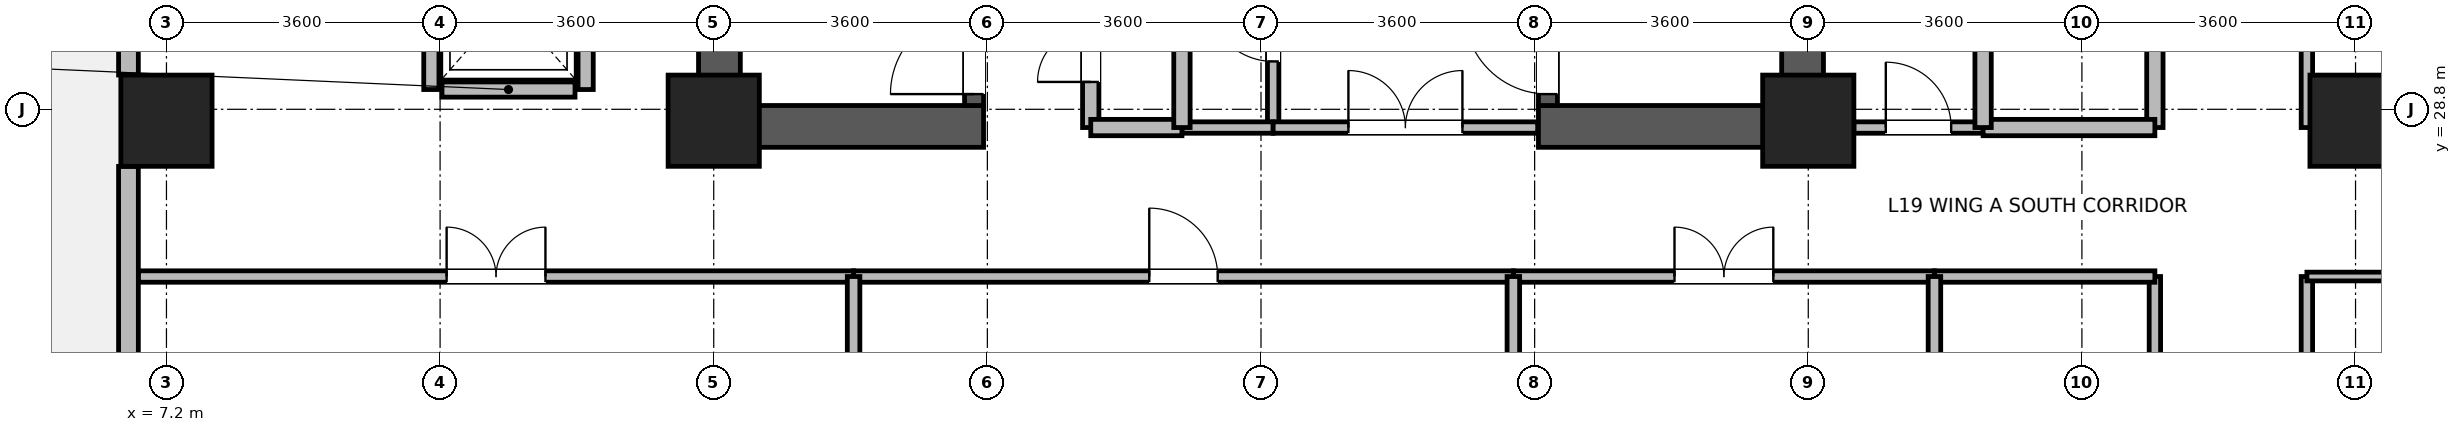
"""IFC4 building model, lengths in metres.
Left out: names, types, materials, properties, quantities, classifications, styles, units other than length and angle.
Written with IfcOpenShell. Run it as: python <this file> out.ifc"""

import sys

from ifc_helpers import new_model, si_unit, direction, frame, frame_2d, origin, origin_2d, place, context, subcontext, project, spatial, rectangle, extrude, source, transform, mapped, element, fill, save


model = new_model("IFC4")
c1 = context("Model", 3, precision=1e-05, world=origin(), true_north=direction((0.0, 1.0)))
c2 = subcontext(c1, "Body", "Model", "MODEL_VIEW")
j1 = project(units=[si_unit("LENGTHUNIT", "METRE"), si_unit("PLANEANGLEUNIT", "RADIAN")], contexts=[c1])
p1 = place(None, origin())
s1 = spatial("IfcSite", under=j1, at=p1, CompositionType="ELEMENT")
p2 = place(p1, origin())
s2 = spatial("IfcBuilding", under=s1, at=p2, CompositionType="ELEMENT")
p3 = place(p2, frame((0.0, 0.0, 78.6)))
s3 = spatial("IfcBuildingStorey", under=s2, at=p3, CompositionType="ELEMENT", Elevation=78.6)
for number, where, z_axis, x_axis in (
    (1, (14.475, 28.3, 0.0), (0.0, 0.0, 1.0), (0.0, 1.0, 0.0)),
    (2, (28.725, 28.3, 0.0), (0.0, 0.0, 1.0), (0.0, 1.0, 0.0)),
):
    element("IfcWall", number, at=place(p3, frame(where, z_axis=z_axis, x_axis=x_axis)), inside=s3, PredefinedType="SHEAR", context=c2, shape_type="SweptSolid", body=[
        extrude(rectangle(XDim=8.1, YDim=0.55, at=frame_2d((4.05, 0.0))), origin(), (0.0, 0.0, 1.0), 3.45),
    ])
for number, where, z_axis, x_axis in (
    (3, (14.75, 28.575, 0.0), (0.0, 0.0, 1.0), (1.0, 0.0, 0.0)),
    (4, (25.25, 28.575, 0.0), (0.0, 0.0, 1.0), (1.0, 0.0, 0.0)),
):
    element("IfcWall", number, at=place(p3, frame(where, z_axis=z_axis, x_axis=x_axis)), inside=s3, PredefinedType="SHEAR", context=c2, shape_type="SweptSolid", body=[
        extrude(rectangle(XDim=3.2, YDim=0.55, at=frame_2d((1.6, 0.0))), origin(), (0.0, 0.0, 1.0), 3.45),
    ])
p4 = place(p3, frame((17.825, 28.85, 0.0), z_axis=(0.0, 0.0, 1.0), x_axis=(0.0, 1.0, 0.0)))
e5 = element("IfcWall", 5, at=p4, inside=s3, PredefinedType="SHEAR", context=c2, shape_type="SweptSolid", body=[
    extrude(rectangle(XDim=7.0, YDim=0.25, at=frame_2d((3.5, 0.0))), origin(), (0.0, 0.0, 1.0), 3.45),
])
p5 = place(p4, frame((0.15, 0.0, 0.0)))
e6 = element("IfcOpeningElement", 6, at=p5, cuts=e5, PredefinedType="OPENING", context=c2, shape_type="SweptSolid", body=[
    extrude(rectangle(XDim=1.1, YDim=2.08, at=frame_2d((0.55, 1.04))), frame((0.0, 0.135, 0.0), z_axis=(0.0, -1.0, 0.0), x_axis=(1.0, 0.0, 0.0)), (0.0, 0.0, 1.0), 0.27),
])
p6 = place(p3, frame((25.375, 28.85, 0.0), z_axis=(0.0, 0.0, 1.0), x_axis=(0.0, 1.0, 0.0)))
e7 = element("IfcWall", 7, at=p6, inside=s3, PredefinedType="SHEAR", context=c2, shape_type="SweptSolid", body=[
    extrude(rectangle(XDim=7.0, YDim=0.25, at=frame_2d((3.5, 0.0))), origin(), (0.0, 0.0, 1.0), 3.45),
])
p7 = place(p6, frame((0.15, 0.0, 0.0)))
e8 = element("IfcOpeningElement", 8, at=p7, cuts=e7, PredefinedType="OPENING", context=c2, shape_type="SweptSolid", body=[
    extrude(rectangle(XDim=1.1, YDim=2.08, at=frame_2d((0.55, 1.04))), frame((0.0, 0.135, 0.0), z_axis=(0.0, -1.0, 0.0), x_axis=(1.0, 0.0, 0.0)), (0.0, 0.0, 1.0), 0.27),
])
m1 = source(origin(), c2, "Body", "SweptSolid", [
    extrude(rectangle(XDim=1.2, YDim=1.2, at=origin_2d()), origin(), (0.0, 0.0, 1.0), 3.7),
])
for number, where, z_axis, x_axis in (
    (9, (7.2, 28.65, 0.0), (0.0, 0.0, 1.0), (1.0, 0.0, 0.0)),
    (10, (14.4, 28.65, 0.0), (0.0, 0.0, 1.0), (1.0, 0.0, 0.0)),
    (11, (28.8, 28.65, 0.0), (0.0, 0.0, 1.0), (1.0, 0.0, 0.0)),
    (12, (36.0, 28.65, 0.0), (0.0, 0.0, 1.0), (1.0, 0.0, 0.0)),
):
    element("IfcColumn", number, at=place(p3, frame(where, z_axis=z_axis, x_axis=x_axis)), inside=s3, PredefinedType="COLUMN", context=c2, shape_type="MappedRepresentation", body=[
        mapped(m1, transform((0.0, 0.0, 0.0), x_axis=(1.0, 0.0, 0.0), y_axis=(0.0, 1.0, 0.0), z_axis=(0.0, 0.0, 1.0), scale=1.0)),
    ])
p8 = place(p3, frame((6.7, 29.251, 0.0), z_axis=(0.0, 0.0, 1.0), x_axis=(0.0, 1.0, 0.0)))
e13 = element("IfcWall", 13, at=p8, inside=s3, PredefinedType="STANDARD", context=c2, shape_type="SweptSolid", body=[
    extrude(rectangle(XDim=6.298, YDim=0.26, at=frame_2d((3.149, 0.0))), origin(), (0.0, 0.0, 1.0), 3.43),
])
p9 = place(p8, frame((2.674, 0.0, 0.85)))
e14 = element("IfcOpeningElement", 14, at=p9, cuts=e13, PredefinedType="OPENING", context=c2, shape_type="SweptSolid", body=[
    extrude(rectangle(XDim=0.95, YDim=1.75, at=frame_2d((0.475, 0.875))), frame((0.0, 0.14, 0.0), z_axis=(0.0, -1.0, 0.0), x_axis=(1.0, 0.0, 0.0)), (0.0, 0.0, 1.0), 0.28),
])
p10 = place(p8, frame((1.112, 0.0, 0.85)))
e15 = element("IfcOpeningElement", 15, at=p10, cuts=e13, PredefinedType="OPENING", context=c2, shape_type="SweptSolid", body=[
    extrude(rectangle(XDim=0.95, YDim=1.75, at=frame_2d((0.475, 0.875))), frame((0.0, 0.14, 0.0), z_axis=(0.0, -1.0, 0.0), x_axis=(1.0, 0.0, 0.0)), (0.0, 0.0, 1.0), 0.28),
])
p11 = place(p3, frame((6.7, 21.47, 0.0), z_axis=(0.0, 0.0, 1.0), x_axis=(0.0, 1.0, 0.0)))
e16 = element("IfcWall", 16, at=p11, inside=s3, PredefinedType="STANDARD", context=c2, shape_type="SweptSolid", body=[
    extrude(rectangle(XDim=6.579, YDim=0.26, at=frame_2d((3.29, 0.0))), origin(), (0.0, 0.0, 1.0), 3.43),
])
p12 = place(p11, frame((2.814, 0.0, 0.85)))
e17 = element("IfcOpeningElement", 17, at=p12, cuts=e16, PredefinedType="OPENING", context=c2, shape_type="SweptSolid", body=[
    extrude(rectangle(XDim=0.95, YDim=1.75, at=frame_2d((0.475, 0.875))), frame((0.0, 0.14, 0.0), z_axis=(0.0, -1.0, 0.0), x_axis=(1.0, 0.0, 0.0)), (0.0, 0.0, 1.0), 0.28),
])
p13 = place(p11, frame((1.183, 0.0, 0.85)))
e18 = element("IfcOpeningElement", 18, at=p13, cuts=e16, PredefinedType="OPENING", context=c2, shape_type="SweptSolid", body=[
    extrude(rectangle(XDim=0.95, YDim=1.75, at=frame_2d((0.475, 0.875))), frame((0.0, 0.14, 0.0), z_axis=(0.0, -1.0, 0.0), x_axis=(1.0, 0.0, 0.0)), (0.0, 0.0, 1.0), 0.28),
])
p14 = place(p3, frame((10.825, 29.06, 0.0), z_axis=(0.0, 0.0, 1.0), x_axis=(1.0, 0.0, 0.0)))
e19 = element("IfcWall", 19, at=p14, inside=s3, PredefinedType="PARTITIONING", context=c2, shape_type="SweptSolid", body=[
    extrude(rectangle(XDim=1.75, YDim=0.2, at=frame_2d((0.875, 0.0))), origin(), (0.0, 0.0, 1.0), 3.43),
])
for number, where, z_axis, x_axis in (
    (20, (10.685, 29.06, 0.0), (0.0, 0.0, 1.0), (0.0, 1.0, 0.0)),
    (21, (12.715, 29.06, 0.0), (0.0, 0.0, 1.0), (0.0, 1.0, 0.0)),
):
    element("IfcWall", number, at=place(p3, frame(where, z_axis=z_axis, x_axis=x_axis)), inside=s3, PredefinedType="PARTITIONING", context=c2, shape_type="SweptSolid", body=[
        extrude(rectangle(XDim=2.28, YDim=0.2, at=frame_2d((1.14, 0.0))), origin(), (0.0, 0.0, 1.0), 3.43),
    ])
p15 = place(p3, frame((35.36, 16.96, 0.0), z_axis=(0.0, 0.0, 1.0), x_axis=(0.0, 1.0, 0.0)))
e22 = element("IfcWall", 22, at=p15, inside=s3, PredefinedType="PARTITIONING", context=c2, shape_type="SweptSolid", body=[
    extrude(rectangle(XDim=9.64, YDim=0.15, at=frame_2d((4.82, 0.0))), origin(), (0.0, 0.0, 1.0), 3.43),
])
p16 = place(p15, frame((2.435, 0.0, 0.0)))
e23 = element("IfcOpeningElement", 23, at=p16, cuts=e22, PredefinedType="OPENING", context=c2, shape_type="SweptSolid", body=[
    extrude(rectangle(XDim=1.3, YDim=2.12, at=frame_2d((0.65, 1.06))), frame((0.0, 0.085, 0.0), z_axis=(0.0, -1.0, 0.0), x_axis=(1.0, 0.0, 0.0)), (0.0, 0.0, 1.0), 0.17),
])
p17 = place(p3, frame((6.832, 26.6, 0.0), z_axis=(0.0, 0.0, 1.0), x_axis=(1.0, 0.0, 0.0)))
e24 = element("IfcWall", 24, at=p17, inside=s3, PredefinedType="PARTITIONING", context=c2, shape_type="SweptSolid", body=[
    extrude(rectangle(XDim=9.408, YDim=0.15, at=frame_2d((4.704, 0.0))), origin(), (0.0, 0.0, 1.0), 3.43),
])
p18 = place(p17, frame((4.054, 0.0, 0.0)))
e25 = element("IfcOpeningElement", 25, at=p18, cuts=e24, PredefinedType="OPENING", context=c2, shape_type="SweptSolid", body=[
    extrude(rectangle(XDim=1.3, YDim=2.12, at=frame_2d((0.65, 1.06))), frame((0.0, 0.085, 0.0), z_axis=(0.0, -1.0, 0.0), x_axis=(1.0, 0.0, 0.0)), (0.0, 0.0, 1.0), 0.17),
])
p19 = place(p3, frame((16.24, 26.6, 0.0), z_axis=(0.0, 0.0, 1.0), x_axis=(1.0, 0.0, 0.0)))
e26 = element("IfcWall", 26, at=p19, inside=s3, PredefinedType="PARTITIONING", context=c2, shape_type="SweptSolid", body=[
    extrude(rectangle(XDim=8.68, YDim=0.15, at=frame_2d((4.34, 0.0))), origin(), (0.0, 0.0, 1.0), 3.43),
])
p20 = place(p19, frame((3.89, 0.0, 0.0)))
e27 = element("IfcOpeningElement", 27, at=p20, cuts=e26, PredefinedType="OPENING", context=c2, shape_type="SweptSolid", body=[
    extrude(rectangle(XDim=0.9, YDim=2.08, at=frame_2d((0.45, 1.04))), frame((0.0, 0.085, 0.0), z_axis=(0.0, -1.0, 0.0), x_axis=(1.0, 0.0, 0.0)), (0.0, 0.0, 1.0), 0.17),
])
p21 = place(p3, frame((35.36, 28.56, 0.0), z_axis=(0.0, 0.0, 1.0), x_axis=(0.0, 1.0, 0.0)))
e28 = element("IfcWall", 28, at=p21, inside=s3, PredefinedType="PARTITIONING", context=c2, shape_type="SweptSolid", body=[
    extrude(rectangle(XDim=7.68, YDim=0.15, at=frame_2d((3.84, 0.0))), origin(), (0.0, 0.0, 1.0), 3.43),
])
p22 = place(p21, frame((3.19, 0.0, 0.0)))
e29 = element("IfcOpeningElement", 29, at=p22, cuts=e28, PredefinedType="OPENING", context=c2, shape_type="SweptSolid", body=[
    extrude(rectangle(XDim=1.3, YDim=2.12, at=frame_2d((0.65, 1.06))), frame((0.0, 0.085, 0.0), z_axis=(0.0, -1.0, 0.0), x_axis=(1.0, 0.0, 0.0)), (0.0, 0.0, 1.0), 0.17),
])
p23 = place(p3, frame((24.92, 26.6, 0.0), z_axis=(0.0, 0.0, 1.0), x_axis=(1.0, 0.0, 0.0)))
e30 = element("IfcWall", 30, at=p23, inside=s3, PredefinedType="PARTITIONING", context=c2, shape_type="SweptSolid", body=[
    extrude(rectangle(XDim=5.54, YDim=0.15, at=frame_2d((2.77, 0.0))), origin(), (0.0, 0.0, 1.0), 3.43),
])
p24 = place(p23, frame((2.12, 0.0, 0.0)))
e31 = element("IfcOpeningElement", 31, at=p24, cuts=e30, PredefinedType="OPENING", context=c2, shape_type="SweptSolid", body=[
    extrude(rectangle(XDim=1.3, YDim=2.12, at=frame_2d((0.65, 1.06))), frame((0.0, 0.085, 0.0), z_axis=(0.0, -1.0, 0.0), x_axis=(1.0, 0.0, 0.0)), (0.0, 0.0, 1.0), 0.17),
])
p25 = place(p3, frame((33.36, 21.6, 0.0), z_axis=(0.0, 0.0, 1.0), x_axis=(0.0, 1.0, 0.0)))
e32 = element("IfcWall", 32, at=p25, inside=s3, PredefinedType="PARTITIONING", context=c2, shape_type="SweptSolid", body=[
    extrude(rectangle(XDim=5.0, YDim=0.15, at=frame_2d((2.5, 0.0))), origin(), (0.0, 0.0, 1.0), 3.43),
])
p26 = place(p25, frame((2.07, 0.0, 0.0)))
e33 = element("IfcOpeningElement", 33, at=p26, cuts=e32, PredefinedType="OPENING", context=c2, shape_type="SweptSolid", body=[
    extrude(rectangle(XDim=0.86, YDim=2.02, at=frame_2d((0.43, 1.01))), frame((0.0, 0.085, 0.0), z_axis=(0.0, -1.0, 0.0), x_axis=(1.0, 0.0, 0.0)), (0.0, 0.0, 1.0), 0.17),
])
p27 = place(p3, frame((33.36, 28.56, 0.0), z_axis=(0.0, 0.0, 1.0), x_axis=(0.0, 1.0, 0.0)))
e34 = element("IfcWall", 34, at=p27, inside=s3, PredefinedType="PARTITIONING", context=c2, shape_type="SweptSolid", body=[
    extrude(rectangle(XDim=3.84, YDim=0.215, at=frame_2d((1.92, 0.0))), origin(), (0.0, 0.0, 1.0), 3.43),
])
p28 = place(p27, frame((1.22, 0.0, 0.0)))
e35 = element("IfcOpeningElement", 35, at=p28, cuts=e34, PredefinedType="OPENING", context=c2, shape_type="SweptSolid", body=[
    extrude(rectangle(XDim=1.4, YDim=2.15, at=frame_2d((0.7, 1.075))), frame((0.0, 0.118, 0.0), z_axis=(0.0, -1.0, 0.0), x_axis=(1.0, 0.0, 0.0)), (0.0, 0.0, 1.0), 0.235),
])
p29 = place(p3, frame((30.46, 26.6, 0.0), z_axis=(0.0, 0.0, 1.0), x_axis=(1.0, 0.0, 0.0)))
e36 = element("IfcWall", 36, at=p29, inside=s3, PredefinedType="PARTITIONING", context=c2, shape_type="SweptSolid", body=[
    extrude(rectangle(XDim=2.9, YDim=0.15, at=frame_2d((1.45, 0.0))), origin(), (0.0, 0.0, 1.0), 3.43),
])
p30 = place(p3, frame((19.36, 28.56, 0.0), z_axis=(0.0, 0.0, 1.0), x_axis=(0.0, 1.0, 0.0)))
e37 = element("IfcWall", 37, at=p30, inside=s3, PredefinedType="PARTITIONING", context=c2, shape_type="SweptSolid", body=[
    extrude(rectangle(XDim=2.6, YDim=0.215, at=frame_2d((1.3, 0.0))), origin(), (0.0, 0.0, 1.0), 3.43),
])
p31 = place(p30, frame((0.6, 0.0, 0.0)))
e38 = element("IfcOpeningElement", 38, at=p31, cuts=e37, PredefinedType="OPENING", context=c2, shape_type="SweptSolid", body=[
    extrude(rectangle(XDim=1.4, YDim=2.15, at=frame_2d((0.7, 1.075))), frame((0.0, 0.118, 0.0), z_axis=(0.0, -1.0, 0.0), x_axis=(1.0, 0.0, 0.0)), (0.0, 0.0, 1.0), 0.235),
])
p32 = place(p3, frame((21.76, 28.56, 0.0), z_axis=(0.0, 0.0, 1.0), x_axis=(0.0, 1.0, 0.0)))
e39 = element("IfcWall", 39, at=p32, inside=s3, PredefinedType="PARTITIONING", context=c2, shape_type="SweptSolid", body=[
    extrude(rectangle(XDim=2.6, YDim=0.15, at=frame_2d((1.3, 0.0))), origin(), (0.0, 0.0, 1.0), 3.43),
])
p33 = place(p32, frame((0.87, 0.0, 0.0)))
e40 = element("IfcOpeningElement", 40, at=p33, cuts=e39, PredefinedType="OPENING", context=c2, shape_type="SweptSolid", body=[
    extrude(rectangle(XDim=0.86, YDim=2.02, at=frame_2d((0.43, 1.01))), frame((0.0, 0.085, 0.0), z_axis=(0.0, -1.0, 0.0), x_axis=(1.0, 0.0, 0.0)), (0.0, 0.0, 1.0), 0.17),
])
p34 = place(p3, frame((29.4, 28.56, 0.0), z_axis=(0.0, 0.0, 1.0), x_axis=(1.0, 0.0, 0.0)))
e41 = element("IfcWall", 41, at=p34, inside=s3, PredefinedType="PARTITIONING", context=c2, shape_type="SweptSolid", body=[
    extrude(rectangle(XDim=1.7, YDim=0.15, at=frame_2d((0.85, 0.0))), origin(), (0.0, 0.0, 1.0), 2.78),
])
p35 = place(p34, frame((0.42, 0.0, 0.0)))
e42 = element("IfcOpeningElement", 42, at=p35, cuts=e41, PredefinedType="OPENING", context=c2, shape_type="SweptSolid", body=[
    extrude(rectangle(XDim=0.86, YDim=2.02, at=frame_2d((0.43, 1.01))), frame((0.0, 0.085, 0.0), z_axis=(0.0, -1.0, 0.0), x_axis=(1.0, 0.0, 0.0)), (0.0, 0.0, 1.0), 0.17),
])
p36 = place(p3, frame((31.1, 28.56, 0.0), z_axis=(0.0, 0.0, 1.0), x_axis=(1.0, 0.0, 0.0)))
e43 = element("IfcWall", 43, at=p36, inside=s3, PredefinedType="PARTITIONING", context=c2, shape_type="SweptSolid", body=[
    extrude(rectangle(XDim=2.26, YDim=0.215, at=frame_2d((1.13, 0.0))), origin(), (0.0, 0.0, 1.0), 2.78),
])
p37 = place(p3, frame((20.56, 28.56, 0.0), z_axis=(0.0, 0.0, 1.0), x_axis=(1.0, 0.0, 0.0)))
e44 = element("IfcWall", 44, at=p37, inside=s3, PredefinedType="PARTITIONING", context=c2, shape_type="SweptSolid", body=[
    extrude(rectangle(XDim=1.2, YDim=0.15, at=frame_2d((0.6, 0.0))), origin(), (0.0, 0.0, 1.0), 2.23),
])
p38 = place(p3, frame((19.36, 28.56, 0.0), z_axis=(0.0, 0.0, 1.0), x_axis=(1.0, 0.0, 0.0)))
e45 = element("IfcWall", 45, at=p38, inside=s3, PredefinedType="PARTITIONING", context=c2, shape_type="SweptSolid", body=[
    extrude(rectangle(XDim=1.2, YDim=0.215, at=frame_2d((0.6, 0.0))), origin(), (0.0, 0.0, 1.0), 2.23),
])
p39 = place(p3, frame((35.36, 26.6, 0.0), z_axis=(0.0, 0.0, 1.0), x_axis=(1.0, 0.0, 0.0)))
e46 = element("IfcWall", 46, at=p39, inside=s3, PredefinedType="PARTITIONING", context=c2, shape_type="SweptSolid", body=[
    extrude(rectangle(XDim=7.24, YDim=0.115, at=frame_2d((3.62, 0.0))), origin(), (0.0, 0.0, 1.0), 3.43),
])
for number, where, z_axis, x_axis in (
    (47, (16.24, 21.732, 0.0), (0.0, 0.0, 1.0), (0.0, 1.0, 0.0)),
    (48, (24.92, 21.732, 0.0), (0.0, 0.0, 1.0), (0.0, 1.0, 0.0)),
    (49, (30.46, 21.732, 0.0), (0.0, 0.0, 1.0), (0.0, 1.0, 0.0)),
):
    element("IfcWall", number, at=place(p3, frame(where, z_axis=z_axis, x_axis=x_axis)), inside=s3, PredefinedType="PARTITIONING", context=c2, shape_type="SweptSolid", body=[
        extrude(rectangle(XDim=4.868, YDim=0.165, at=frame_2d((2.434, 0.0))), origin(), (0.0, 0.0, 1.0), 3.43),
    ])
p40 = place(p3, frame((31.1, 28.56, 0.0), z_axis=(0.0, 0.0, 1.0), x_axis=(0.0, 1.0, 0.0)))
e50 = element("IfcWall", 50, at=p40, inside=s3, PredefinedType="PARTITIONING", context=c2, shape_type="SweptSolid", body=[
    extrude(rectangle(XDim=3.84, YDim=0.215, at=frame_2d((1.92, 0.0))), origin(), (0.0, 0.0, 1.0), 3.43),
])
p41 = place(p3, frame((21.76, 28.56, 0.0), z_axis=(0.0, 0.0, 1.0), x_axis=(1.0, 0.0, 0.0)))
e51 = element("IfcWall", 51, at=p41, inside=s3, PredefinedType="PARTITIONING", context=c2, shape_type="SweptSolid", body=[
    extrude(rectangle(XDim=3.48, YDim=0.15, at=frame_2d((1.74, 0.0))), origin(), (0.0, 0.0, 1.0), 2.23),
])
p42 = place(p41, frame((0.99, 0.0, 0.0)))
e52 = element("IfcOpeningElement", 52, at=p42, cuts=e51, PredefinedType="OPENING", context=c2, shape_type="SweptSolid", body=[
    extrude(rectangle(XDim=1.5, YDim=2.1, at=frame_2d((0.75, 1.05))), frame((0.0, 0.085, 0.0), z_axis=(0.0, -1.0, 0.0), x_axis=(1.0, 0.0, 0.0)), (0.0, 0.0, 1.0), 0.17),
])
p43 = place(p3, frame((20.56, 28.56, 0.0), z_axis=(0.0, 0.0, 1.0), x_axis=(0.0, 1.0, 0.0)))
e53 = element("IfcWall", 53, at=p43, inside=s3, PredefinedType="PARTITIONING", context=c2, shape_type="SweptSolid", body=[
    extrude(rectangle(XDim=2.6, YDim=0.215, at=frame_2d((1.3, 0.0))), origin(), (0.0, 0.0, 1.0), 3.43),
])
p44 = place(p5, origin())
e54 = element("IfcDoor", 54, at=p44, inside=s3, OperationType="SINGLE_SWING_LEFT", PredefinedType="DOOR", context=c2, shape_type="SweptSolid", body=[
    extrude(rectangle(XDim=1.1, YDim=2.08, at=frame_2d((0.55, 1.04))), frame((0.0, 0.025, 0.0), z_axis=(0.0, -1.0, 0.0), x_axis=(1.0, 0.0, 0.0)), (0.0, 0.0, 1.0), 0.05),
])
fill(e6, e54)
p45 = place(p7, origin())
e55 = element("IfcDoor", 55, at=p45, inside=s3, OperationType="SINGLE_SWING_RIGHT", PredefinedType="DOOR", context=c2, shape_type="SweptSolid", body=[
    extrude(rectangle(XDim=1.1, YDim=2.08, at=frame_2d((0.55, 1.04))), frame((0.0, 0.025, 0.0), z_axis=(0.0, -1.0, 0.0), x_axis=(1.0, 0.0, 0.0)), (0.0, 0.0, 1.0), 0.05),
])
fill(e8, e55)
p46 = place(p18, origin())
e56 = element("IfcDoor", 56, at=p46, inside=s3, OperationType="DOUBLE_DOOR_SINGLE_SWING", PredefinedType="DOOR", context=c2, shape_type="SweptSolid", body=[
    extrude(rectangle(XDim=1.3, YDim=2.12, at=frame_2d((0.65, 1.06))), frame((0.0, 0.025, 0.0), z_axis=(0.0, -1.0, 0.0), x_axis=(1.0, 0.0, 0.0)), (0.0, 0.0, 1.0), 0.05),
])
fill(e25, e56)
p47 = place(p20, origin())
e57 = element("IfcDoor", 57, at=p47, inside=s3, OperationType="SINGLE_SWING_LEFT", PredefinedType="DOOR", context=c2, shape_type="SweptSolid", body=[
    extrude(rectangle(XDim=0.9, YDim=2.08, at=frame_2d((0.45, 1.04))), frame((0.0, 0.025, 0.0), z_axis=(0.0, -1.0, 0.0), x_axis=(1.0, 0.0, 0.0)), (0.0, 0.0, 1.0), 0.05),
])
fill(e27, e57)
p48 = place(p24, origin())
e58 = element("IfcDoor", 58, at=p48, inside=s3, OperationType="DOUBLE_DOOR_SINGLE_SWING", PredefinedType="DOOR", context=c2, shape_type="SweptSolid", body=[
    extrude(rectangle(XDim=1.3, YDim=2.12, at=frame_2d((0.65, 1.06))), frame((0.0, 0.025, 0.0), z_axis=(0.0, -1.0, 0.0), x_axis=(1.0, 0.0, 0.0)), (0.0, 0.0, 1.0), 0.05),
])
fill(e31, e58)
p49 = place(p31, origin())
e59 = element("IfcDoor", 59, at=p49, inside=s3, OperationType="DOUBLE_DOOR_SINGLE_SWING", PredefinedType="DOOR", context=c2, shape_type="SweptSolid", body=[
    extrude(rectangle(XDim=1.4, YDim=2.15, at=frame_2d((0.7, 1.075))), frame((0.0, 0.025, 0.0), z_axis=(0.0, -1.0, 0.0), x_axis=(1.0, 0.0, 0.0)), (0.0, 0.0, 1.0), 0.05),
])
fill(e38, e59)
p50 = place(p33, origin())
e60 = element("IfcDoor", 60, at=p50, inside=s3, OperationType="SINGLE_SWING_RIGHT", PredefinedType="DOOR", context=c2, shape_type="SweptSolid", body=[
    extrude(rectangle(XDim=0.86, YDim=2.02, at=frame_2d((0.43, 1.01))), frame((0.0, 0.025, 0.0), z_axis=(0.0, -1.0, 0.0), x_axis=(1.0, 0.0, 0.0)), (0.0, 0.0, 1.0), 0.05),
])
fill(e40, e60)
p51 = place(p35, origin())
e61 = element("IfcDoor", 61, at=p51, inside=s3, OperationType="SINGLE_SWING_LEFT", PredefinedType="DOOR", context=c2, shape_type="SweptSolid", body=[
    extrude(rectangle(XDim=0.86, YDim=2.02, at=frame_2d((0.43, 1.01))), frame((0.0, 0.025, 0.0), z_axis=(0.0, -1.0, 0.0), x_axis=(1.0, 0.0, 0.0)), (0.0, 0.0, 1.0), 0.05),
])
fill(e42, e61)
p52 = place(p42, origin())
e62 = element("IfcDoor", 62, at=p52, inside=s3, OperationType="DOUBLE_DOOR_SINGLE_SWING", PredefinedType="DOOR", context=c2, shape_type="SweptSolid", body=[
    extrude(rectangle(XDim=1.5, YDim=2.1, at=frame_2d((0.75, 1.05))), frame((0.0, 0.025, 0.0), z_axis=(0.0, -1.0, 0.0), x_axis=(1.0, 0.0, 0.0)), (0.0, 0.0, 1.0), 0.05),
])
fill(e52, e62)
save(model, sys.argv[1])
